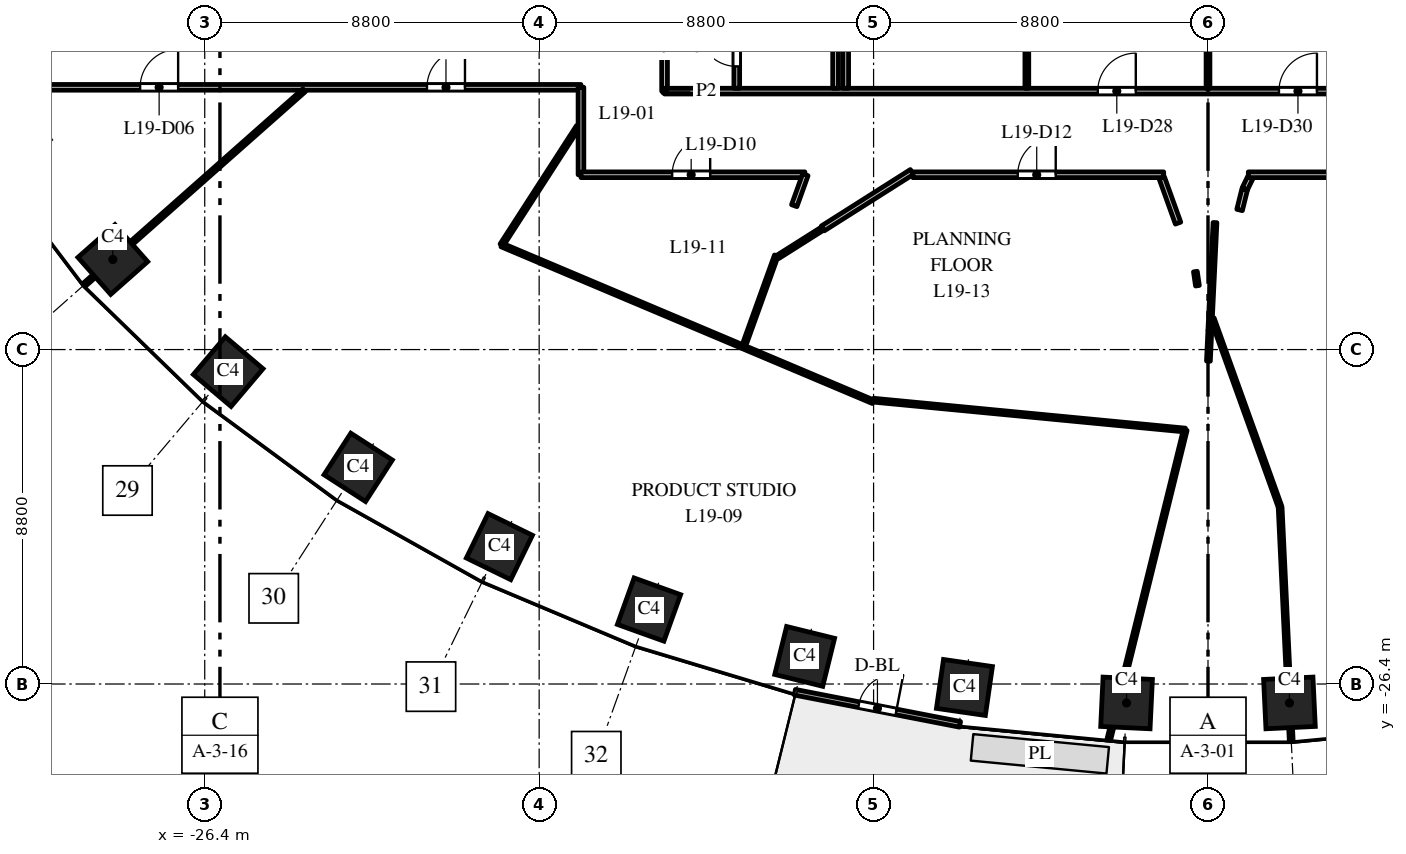
"""IFC4 building model, lengths in metres.
Left out: names, types, materials, properties, quantities, classifications, styles, units other than length and angle.
Written with IfcOpenShell. Run it as: python <this file> out.ifc"""

import sys

from ifc_helpers import new_model, si_unit, direction, frame, frame_2d, origin, origin_2d, place, context, subcontext, project, spatial, rectangle, extrude, element, fill, save


model = new_model("IFC4")
c1 = context("Model", 3, precision=1e-05, world=origin(), true_north=direction((0.0, 1.0)))
c2 = subcontext(c1, "Body", "Model", "MODEL_VIEW")
j1 = project(units=[si_unit("LENGTHUNIT", "METRE"), si_unit("PLANEANGLEUNIT", "RADIAN")], contexts=[c1])
p1 = place(None, origin())
s1 = spatial("IfcSite", under=j1, at=p1, CompositionType="ELEMENT")
p2 = place(p1, origin())
s2 = spatial("IfcBuilding", under=s1, at=p2, CompositionType="ELEMENT")
p3 = place(p2, frame((0.0, 0.0, 88.0)))
s3 = spatial("IfcBuildingStorey", under=s2, at=p3, CompositionType="ELEMENT", Elevation=88.0)
for number, where, z_axis, x_axis in (
    (1, (-28.819, -15.23, 0.0), (0.0, 0.0, 1.0), (0.663, -0.749, 0.0)),
    (2, (-25.783, -18.18, 0.0), (0.0, 0.0, 1.0), (0.763, -0.646, 0.0)),
    (3, (-22.362, -20.7, 0.0), (0.0, 0.0, 1.0), (0.84, -0.542, 0.0)),
    (4, (-18.646, -22.785, 0.0), (0.0, 0.0, 1.0), (0.898, -0.439, 0.0)),
    (5, (-14.709, -24.441, 0.0), (0.0, 0.0, 1.0), (0.941, -0.338, 0.0)),
    (6, (-10.613, -25.674, 0.0), (0.0, 0.0, 1.0), (0.971, -0.24, 0.0)),
    (7, (-6.409, -26.491, 0.0), (0.0, 0.0, 1.0), (0.99, -0.143, 0.0)),
    (8, (-2.143, -26.898, 0.0), (0.0, 0.0, 1.0), (0.999, -0.048, 0.0)),
    (9, (2.143, -26.898, 0.0), (0.0, 0.0, 1.0), (0.999, 0.048, 0.0)),
):
    element("IfcColumn", number, at=place(p3, frame(where, z_axis=z_axis, x_axis=x_axis)), inside=s3, PredefinedType="COLUMN", context=c2, shape_type="SweptSolid", body=[
        extrude(rectangle(XDim=1.3, YDim=1.3, at=origin_2d()), origin(), (0.0, 0.0, 1.0), 4.0),
    ])
p4 = place(p3, frame((-10.871, -26.617, 0.0), z_axis=(0.0, 0.0, 1.0), x_axis=(0.981631174778, -0.190788460615, 0.0)))
e10 = element("IfcWall", 10, at=p4, inside=s3, PredefinedType="STANDARD", context=c2, shape_type="SweptSolid", body=[
    extrude(rectangle(XDim=4.426, YDim=0.15, at=frame_2d((2.213, 0.0))), origin(), (0.0, 0.0, 1.0), 3.7),
])
p5 = place(p4, frame((1.713, 0.0, 0.0)))
e11 = element("IfcOpeningElement", 11, at=p5, cuts=e10, PredefinedType="OPENING", context=c2, shape_type="SweptSolid", body=[
    extrude(rectangle(XDim=1.0, YDim=2.4, at=frame_2d((0.5, 1.2))), frame((0.0, 0.085, 0.0), z_axis=(0.0, -1.0, 0.0), x_axis=(1.0, 0.0, 0.0)), (0.0, 0.0, 1.0), 0.17),
])
p6 = place(p3, frame((-31.5, -10.7, 0.0), z_axis=(0.0, 0.0, 1.0), x_axis=(1.0, 0.0, 0.0)))
e12 = element("IfcWall", 12, at=p6, inside=s3, PredefinedType="PARTITIONING", context=c2, shape_type="SweptSolid", body=[
    extrude(rectangle(XDim=15.0, YDim=0.15, at=frame_2d((7.5, 0.0))), origin(), (0.0, 0.0, 1.0), 3.1),
])
p7 = place(p6, frame((3.4, 0.0, 0.0)))
e13 = element("IfcOpeningElement", 13, at=p7, cuts=e12, PredefinedType="OPENING", context=c2, shape_type="SweptSolid", body=[
    extrude(rectangle(XDim=1.0, YDim=2.1, at=frame_2d((0.5, 1.05))), frame((0.0, 0.085, 0.0), z_axis=(0.0, -1.0, 0.0), x_axis=(1.0, 0.0, 0.0)), (0.0, 0.0, 1.0), 0.17),
])
p8 = place(p6, frame((10.948, 0.0, 0.0)))
e14 = element("IfcOpeningElement", 14, at=p8, cuts=e12, PredefinedType="OPENING", context=c2, shape_type="SweptSolid", body=[
    extrude(rectangle(XDim=1.0, YDim=2.1, at=frame_2d((0.5, 1.05))), frame((0.0, 0.085, 0.0), z_axis=(0.0, -1.0, 0.0), x_axis=(1.0, 0.0, 0.0)), (0.0, 0.0, 1.0), 0.17),
])
p9 = place(p3, frame((-29.569, -15.895, 0.0), z_axis=(0.0, 0.0, 1.0), x_axis=(0.748985701008, 0.662586160198, 0.0)))
e15 = element("IfcWall", 15, at=p9, inside=s3, PredefinedType="PARTITIONING", context=c2, shape_type="SweptSolid", body=[
    extrude(rectangle(XDim=7.723, YDim=0.1, at=frame_2d((3.861, 0.0))), origin(), (0.0, 0.0, 1.0), 2.9),
])
p10 = place(p3, frame((-18.586, -14.849, 0.0), z_axis=(0.0, 0.0, 1.0), x_axis=(0.542227325377, 0.840231829684, 0.0)))
e16 = element("IfcWall", 16, at=p10, inside=s3, PredefinedType="PARTITIONING", context=c2, shape_type="SweptSolid", body=[
    extrude(rectangle(XDim=3.709, YDim=0.1, at=frame_2d((1.854, 0.0))), origin(), (0.0, 0.0, 1.0), 2.75),
])
p11 = place(p3, frame((-18.586, -14.849, 0.0), z_axis=(0.0, 0.0, 1.0), x_axis=(0.921309292198, -0.388830539066, 0.0)))
e17 = element("IfcWall", 17, at=p11, inside=s3, PredefinedType="PARTITIONING", context=c2, shape_type="SweptSolid", body=[
    extrude(rectangle(XDim=10.609, YDim=0.1, at=frame_2d((5.304, 0.0))), origin(), (0.0, 0.0, 1.0), 2.85),
])
p12 = place(p3, frame((-16.5, -13.0, 0.0), z_axis=(0.0, 0.0, 1.0), x_axis=(0.0, 1.0, 0.0)))
e18 = element("IfcWall", 18, at=p12, inside=s3, PredefinedType="PARTITIONING", context=c2, shape_type="SweptSolid", body=[
    extrude(rectangle(XDim=2.3, YDim=0.15, at=frame_2d((1.15, 0.0))), origin(), (0.0, 0.0, 1.0), 2.75),
])
p13 = place(p3, frame((-16.5, -13.0, 0.0), z_axis=(0.0, 0.0, 1.0), x_axis=(1.0, 0.0, 0.0)))
e19 = element("IfcWall", 19, at=p13, inside=s3, PredefinedType="PARTITIONING", context=c2, shape_type="SweptSolid", body=[
    extrude(rectangle(XDim=5.893, YDim=0.15, at=frame_2d((2.947, 0.0))), origin(), (0.0, 0.0, 1.0), 2.85),
])
p14 = place(p13, frame((2.4, 0.0, 0.0)))
e20 = element("IfcOpeningElement", 20, at=p14, cuts=e19, PredefinedType="OPENING", context=c2, shape_type="SweptSolid", body=[
    extrude(rectangle(XDim=1.0, YDim=2.1, at=frame_2d((0.5, 1.05))), frame((0.0, 0.085, 0.0), z_axis=(0.0, -1.0, 0.0), x_axis=(1.0, 0.0, 0.0)), (0.0, 0.0, 1.0), 0.17),
])
p15 = place(p3, frame((-14.3, -10.8, 0.0), z_axis=(0.0, 0.0, 1.0), x_axis=(0.0, 1.0, 0.0)))
e21 = element("IfcWall", 21, at=p15, inside=s3, PredefinedType="PARTITIONING", context=c2, shape_type="SweptSolid", body=[
    extrude(rectangle(XDim=21.6, YDim=0.15, at=frame_2d((10.8, 0.0))), origin(), (0.0, 0.0, 1.0), 2.75),
])
p16 = place(p15, frame((10.4, 0.0, 0.0)))
e22 = element("IfcOpeningElement", 22, at=p16, cuts=e21, PredefinedType="OPENING", context=c2, shape_type="SweptSolid", body=[
    extrude(rectangle(XDim=1.0, YDim=2.1, at=frame_2d((0.5, 1.05))), frame((0.0, 0.085, 0.0), z_axis=(0.0, -1.0, 0.0), x_axis=(1.0, 0.0, 0.0)), (0.0, 0.0, 1.0), 0.17),
])
p17 = place(p3, frame((-14.3, -10.8, 0.0), z_axis=(0.0, 0.0, 1.0), x_axis=(1.0, 0.0, 0.0)))
e23 = element("IfcWall", 23, at=p17, inside=s3, PredefinedType="PARTITIONING", context=c2, shape_type="SweptSolid", body=[
    extrude(rectangle(XDim=28.6, YDim=0.15, at=frame_2d((14.3, 0.0))), origin(), (0.0, 0.0, 1.0), 2.85),
])
p18 = place(p17, frame((11.4, 0.0, 0.0)))
e24 = element("IfcOpeningElement", 24, at=p18, cuts=e23, PredefinedType="OPENING", context=c2, shape_type="SweptSolid", body=[
    extrude(rectangle(XDim=1.0, YDim=2.1, at=frame_2d((0.5, 1.05))), frame((0.0, 0.085, 0.0), z_axis=(0.0, -1.0, 0.0), x_axis=(1.0, 0.0, 0.0)), (0.0, 0.0, 1.0), 0.17),
])
p19 = place(p17, frame((16.167, 0.0, 0.0)))
e25 = element("IfcOpeningElement", 25, at=p19, cuts=e23, PredefinedType="OPENING", context=c2, shape_type="SweptSolid", body=[
    extrude(rectangle(XDim=1.0, YDim=2.1, at=frame_2d((0.5, 1.05))), frame((0.0, 0.085, 0.0), z_axis=(0.0, -1.0, 0.0), x_axis=(1.0, 0.0, 0.0)), (0.0, 0.0, 1.0), 0.17),
])
p20 = place(p3, frame((-12.4, -10.725, 0.0), z_axis=(0.0, 0.0, 1.0), x_axis=(0.0, 1.0, 0.0)))
e26 = element("IfcWall", 26, at=p20, inside=s3, PredefinedType="PARTITIONING", context=c2, shape_type="SweptSolid", body=[
    extrude(rectangle(XDim=7.065, YDim=0.15, at=frame_2d((3.533, 0.0))), origin(), (0.0, 0.0, 1.0), 2.75),
])
p21 = place(p20, frame((0.575, 0.0, 0.0)))
e27 = element("IfcOpeningElement", 27, at=p21, cuts=e26, PredefinedType="OPENING", context=c2, shape_type="SweptSolid", body=[
    extrude(rectangle(XDim=1.0, YDim=2.1, at=frame_2d((0.5, 1.05))), frame((0.0, 0.085, 0.0), z_axis=(0.0, -1.0, 0.0), x_axis=(1.0, 0.0, 0.0)), (0.0, 0.0, 1.0), 0.17),
])
p22 = place(p20, frame((3.095, 0.0, 0.0)))
e28 = element("IfcOpeningElement", 28, at=p22, cuts=e26, PredefinedType="OPENING", context=c2, shape_type="SweptSolid", body=[
    extrude(rectangle(XDim=1.0, YDim=2.1, at=frame_2d((0.5, 1.05))), frame((0.0, 0.085, 0.0), z_axis=(0.0, -1.0, 0.0), x_axis=(1.0, 0.0, 0.0)), (0.0, 0.0, 1.0), 0.17),
])
p23 = place(p20, frame((5.447, 0.0, 0.0)))
e29 = element("IfcOpeningElement", 29, at=p23, cuts=e26, PredefinedType="OPENING", context=c2, shape_type="SweptSolid", body=[
    extrude(rectangle(XDim=1.0, YDim=2.1, at=frame_2d((0.5, 1.05))), frame((0.0, 0.085, 0.0), z_axis=(0.0, -1.0, 0.0), x_axis=(1.0, 0.0, 0.0)), (0.0, 0.0, 1.0), 0.17),
])
p24 = place(p3, frame((-12.209, -17.486, 0.0), z_axis=(0.0, 0.0, 1.0), x_axis=(0.338698771758, 0.940894862357, 0.0)))
e30 = element("IfcWall", 30, at=p24, inside=s3, PredefinedType="PARTITIONING", context=c2, shape_type="SweptSolid", body=[
    extrude(rectangle(XDim=2.506, YDim=0.1, at=frame_2d((1.253, 0.0))), origin(), (0.0, 0.0, 1.0), 3.7),
])
p25 = place(p3, frame((-11.319, -15.161, 0.0), z_axis=(0.0, 0.0, 1.0), x_axis=(0.845102975348, 0.534603555037, 0.0)))
e31 = element("IfcWall", 31, at=p25, inside=s3, PredefinedType="PARTITIONING", context=c2, shape_type="SweptSolid", body=[
    extrude(rectangle(XDim=1.399, YDim=0.1, at=frame_2d((0.699, 0.0))), origin(), (0.0, 0.0, 1.0), 3.7),
])
p26 = place(p3, frame((-10.888, -13.814, 0.0), z_axis=(0.0, 0.0, 1.0), x_axis=(0.338659506624, 0.940908995904, 0.0)))
e32 = element("IfcWall", 32, at=p26, inside=s3, PredefinedType="PARTITIONING", context=c2, shape_type="SweptSolid", body=[
    extrude(rectangle(XDim=0.865, YDim=0.15, at=frame_2d((0.433, 0.0))), origin(), (0.0, 0.0, 1.0), 2.85),
])
p27 = place(p3, frame((-10.137, -14.413, 0.0), z_axis=(0.0, 0.0, 1.0), x_axis=(0.844666662568, 0.535292657475, 0.0)))
e33 = element("IfcWall", 33, at=p27, inside=s3, PredefinedType="PARTITIONING", context=c2, shape_type="SweptSolid", body=[
    extrude(rectangle(XDim=2.776, YDim=0.15, at=frame_2d((1.388, 0.0))), origin(), (0.0, 0.0, 1.0), 3.7),
])
p28 = place(p3, frame((-9.8, -10.725, 0.0), z_axis=(0.0, 0.0, 1.0), x_axis=(0.0, 1.0, 0.0)))
e34 = element("IfcWall", 34, at=p28, inside=s3, PredefinedType="PARTITIONING", context=c2, shape_type="SweptSolid", body=[
    extrude(rectangle(XDim=7.065, YDim=0.15, at=frame_2d((3.533, 0.0))), origin(), (0.0, 0.0, 1.0), 2.75),
])
p29 = place(p3, frame((-9.533, -10.725, 0.0), z_axis=(0.0, 0.0, 1.0), x_axis=(0.0, 1.0, 0.0)))
e35 = element("IfcWall", 35, at=p29, inside=s3, PredefinedType="PARTITIONING", context=c2, shape_type="SweptSolid", body=[
    extrude(rectangle(XDim=21.45, YDim=0.15, at=frame_2d((10.725, 0.0))), origin(), (0.0, 0.0, 1.0), 2.75),
])
p30 = place(p29, frame((15.575, 0.0, 0.0)))
e36 = element("IfcOpeningElement", 36, at=p30, cuts=e35, PredefinedType="OPENING", context=c2, shape_type="SweptSolid", body=[
    extrude(rectangle(XDim=1.0, YDim=2.1, at=frame_2d((0.5, 1.05))), frame((0.0, 0.085, 0.0), z_axis=(0.0, -1.0, 0.0), x_axis=(1.0, 0.0, 0.0)), (0.0, 0.0, 1.0), 0.17),
])
p31 = place(p3, frame((-8.802, -18.932, 0.0), z_axis=(0.0, 0.0, 1.0), x_axis=(0.99543910623, -0.095399086939, 0.0)))
e37 = element("IfcWall", 37, at=p31, inside=s3, PredefinedType="PARTITIONING", context=c2, shape_type="SweptSolid", body=[
    extrude(rectangle(XDim=8.24, YDim=0.1, at=frame_2d((4.12, 0.0))), origin(), (0.0, 0.0, 1.0), 2.85),
])
p32 = place(p3, frame((-7.767, -13.0, 0.0), z_axis=(0.0, 0.0, 1.0), x_axis=(1.0, 0.0, 0.0)))
e38 = element("IfcWall", 38, at=p32, inside=s3, PredefinedType="PARTITIONING", context=c2, shape_type="SweptSolid", body=[
    extrude(rectangle(XDim=6.601, YDim=0.15, at=frame_2d((3.301, 0.0))), origin(), (0.0, 0.0, 1.0), 2.85),
])
p33 = place(p32, frame((2.76, 0.0, 0.0)))
e39 = element("IfcOpeningElement", 39, at=p33, cuts=e38, PredefinedType="OPENING", context=c2, shape_type="SweptSolid", body=[
    extrude(rectangle(XDim=1.0, YDim=2.1, at=frame_2d((0.5, 1.05))), frame((0.0, 0.085, 0.0), z_axis=(0.0, -1.0, 0.0), x_axis=(1.0, 0.0, 0.0)), (0.0, 0.0, 1.0), 0.17),
])
p34 = place(p3, frame((-4.767, -10.725, 0.0), z_axis=(0.0, 0.0, 1.0), x_axis=(0.0, 1.0, 0.0)))
e40 = element("IfcWall", 40, at=p34, inside=s3, PredefinedType="PARTITIONING", context=c2, shape_type="SweptSolid", body=[
    extrude(rectangle(XDim=4.362, YDim=0.1, at=frame_2d((2.181, 0.0))), origin(), (0.0, 0.0, 1.0), 2.9),
])
p35 = place(p3, frame((-2.609, -27.858, 0.0), z_axis=(0.0, 0.0, 1.0), x_axis=(0.239677840558, 0.970852477334, 0.0)))
e41 = element("IfcWall", 41, at=p35, inside=s3, PredefinedType="PARTITIONING", context=c2, shape_type="SweptSolid", body=[
    extrude(rectangle(XDim=8.385, YDim=0.1, at=frame_2d((4.193, 0.0))), origin(), (0.0, 0.0, 1.0), 2.85),
])
p36 = place(p3, frame((-1.217, -13.079, 0.0), z_axis=(0.0, 0.0, 1.0), x_axis=(0.338140136535, -0.941095769868, 0.0)))
e42 = element("IfcWall", 42, at=p36, inside=s3, PredefinedType="PARTITIONING", context=c2, shape_type="SweptSolid", body=[
    extrude(rectangle(XDim=1.269, YDim=0.15, at=frame_2d((0.634, 0.0))), origin(), (0.0, 0.0, 1.0), 2.85),
])
p37 = place(p3, frame((-0.332, -15.548, 0.0), z_axis=(0.0, 0.0, 1.0), x_axis=(0.143604317757, -0.989635185269, 0.0)))
e43 = element("IfcWall", 43, at=p37, inside=s3, PredefinedType="PARTITIONING", context=c2, shape_type="SweptSolid", body=[
    extrude(rectangle(XDim=0.376, YDim=0.1, at=frame_2d((0.188, 0.0))), origin(), (0.0, 0.0, 1.0), 3.7),
])
p38 = place(p3, frame((0.0, -10.725, 0.0), z_axis=(0.0, 0.0, 1.0), x_axis=(0.0, 1.0, 0.0)))
e44 = element("IfcWall", 44, at=p38, inside=s3, PredefinedType="PARTITIONING", context=c2, shape_type="SweptSolid", body=[
    extrude(rectangle(XDim=3.221, YDim=0.1, at=frame_2d((1.611, 0.0))), origin(), (0.0, 0.0, 1.0), 3.7),
])
p39 = place(p3, frame((0.011, -17.904, 0.0), z_axis=(0.0, 0.0, 1.0), x_axis=(0.046221474857, 0.998931216482, 0.0)))
e45 = element("IfcWall", 45, at=p39, inside=s3, PredefinedType="PARTITIONING", context=c2, shape_type="SweptSolid", body=[
    extrude(rectangle(XDim=0.803, YDim=0.1, at=frame_2d((0.401, 0.0))), origin(), (0.0, 0.0, 1.0), 3.7),
])
p40 = place(p3, frame((0.049, -17.087, 0.0), z_axis=(0.0, 0.0, 1.0), x_axis=(0.047688063475, 0.998862277094, 0.0)))
e46 = element("IfcWall", 46, at=p40, inside=s3, PredefinedType="PARTITIONING", context=c2, shape_type="SweptSolid", body=[
    extrude(rectangle(XDim=2.831, YDim=0.1, at=frame_2d((1.416, 0.0))), origin(), (0.0, 0.0, 1.0), 3.7),
])
p41 = place(p3, frame((0.113, -16.782, 0.0), z_axis=(0.0, 0.0, 1.0), x_axis=(0.338468220543, -0.940977823162, 0.0)))
e47 = element("IfcWall", 47, at=p41, inside=s3, PredefinedType="PARTITIONING", context=c2, shape_type="SweptSolid", body=[
    extrude(rectangle(XDim=5.265, YDim=0.1, at=frame_2d((2.632, 0.0))), origin(), (0.0, 0.0, 1.0), 3.7),
])
p42 = place(p3, frame((0.831, -13.927, 0.0), z_axis=(0.0, 0.0, 1.0), x_axis=(0.240473799965, 0.970655629732, 0.0)))
e48 = element("IfcWall", 48, at=p42, inside=s3, PredefinedType="PARTITIONING", context=c2, shape_type="SweptSolid", body=[
    extrude(rectangle(XDim=0.557, YDim=0.15, at=frame_2d((0.279, 0.0))), origin(), (0.0, 0.0, 1.0), 3.7),
])
p43 = place(p3, frame((0.969, -13.369, 0.0), z_axis=(0.0, 0.0, 1.0), x_axis=(0.440240923942, 0.897879685084, 0.0)))
e49 = element("IfcWall", 49, at=p43, inside=s3, PredefinedType="PARTITIONING", context=c2, shape_type="SweptSolid", body=[
    extrude(rectangle(XDim=0.323, YDim=0.15, at=frame_2d((0.161, 0.0))), origin(), (0.0, 0.0, 1.0), 3.7),
])
p44 = place(p3, frame((1.061, -13.0, 0.0), z_axis=(0.0, 0.0, 1.0), x_axis=(1.0, 0.0, 0.0)))
e50 = element("IfcWall", 50, at=p44, inside=s3, PredefinedType="PARTITIONING", context=c2, shape_type="SweptSolid", body=[
    extrude(rectangle(XDim=6.422, YDim=0.15, at=frame_2d((3.211, 0.0))), origin(), (0.0, 0.0, 1.0), 2.85),
])
p45 = place(p44, frame((2.73, 0.0, 0.0)))
e51 = element("IfcOpeningElement", 51, at=p45, cuts=e50, PredefinedType="OPENING", context=c2, shape_type="SweptSolid", body=[
    extrude(rectangle(XDim=1.0, YDim=2.1, at=frame_2d((0.5, 1.05))), frame((0.0, 0.085, 0.0), z_axis=(0.0, -1.0, 0.0), x_axis=(1.0, 0.0, 0.0)), (0.0, 0.0, 1.0), 0.17),
])
p46 = place(p3, frame((1.898, -21.75, 0.0), z_axis=(0.0, 0.0, 1.0), x_axis=(0.047440765919, -0.998874052986, 0.0)))
e52 = element("IfcWall", 52, at=p46, inside=s3, PredefinedType="PARTITIONING", context=c2, shape_type="SweptSolid", body=[
    extrude(rectangle(XDim=6.155, YDim=0.1, at=frame_2d((3.077, 0.0))), origin(), (0.0, 0.0, 1.0), 2.9),
])
p47 = place(p5, origin())
e53 = element("IfcDoor", 53, at=p47, inside=s3, OperationType="SINGLE_SWING_RIGHT", PredefinedType="DOOR", context=c2, shape_type="SweptSolid", body=[
    extrude(rectangle(XDim=1.0, YDim=2.4, at=frame_2d((0.5, 1.2))), frame((0.0, 0.025, 0.0), z_axis=(0.0, -1.0, 0.0), x_axis=(1.0, 0.0, 0.0)), (0.0, 0.0, 1.0), 0.05),
])
fill(e11, e53)
p48 = place(p21, origin())
e54 = element("IfcDoor", 54, at=p48, inside=s3, OperationType="SINGLE_SWING_RIGHT", PredefinedType="DOOR", context=c2, shape_type="SweptSolid", body=[
    extrude(rectangle(XDim=1.0, YDim=2.1, at=frame_2d((0.5, 1.05))), frame((0.0, 0.025, 0.0), z_axis=(0.0, -1.0, 0.0), x_axis=(1.0, 0.0, 0.0)), (0.0, 0.0, 1.0), 0.05),
])
fill(e27, e54)
p49 = place(p7, origin())
e55 = element("IfcDoor", 55, at=p49, inside=s3, OperationType="SINGLE_SWING_RIGHT", PredefinedType="DOOR", context=c2, shape_type="SweptSolid", body=[
    extrude(rectangle(XDim=1.0, YDim=2.1, at=frame_2d((0.5, 1.05))), frame((0.0, 0.025, 0.0), z_axis=(0.0, -1.0, 0.0), x_axis=(1.0, 0.0, 0.0)), (0.0, 0.0, 1.0), 0.05),
])
fill(e13, e55)
p50 = place(p8, origin())
e56 = element("IfcDoor", 56, at=p50, inside=s3, OperationType="SINGLE_SWING_RIGHT", PredefinedType="DOOR", context=c2, shape_type="SweptSolid", body=[
    extrude(rectangle(XDim=1.0, YDim=2.1, at=frame_2d((0.5, 1.05))), frame((0.0, 0.025, 0.0), z_axis=(0.0, -1.0, 0.0), x_axis=(1.0, 0.0, 0.0)), (0.0, 0.0, 1.0), 0.05),
])
fill(e14, e56)
p51 = place(p14, origin())
e57 = element("IfcDoor", 57, at=p51, inside=s3, OperationType="SINGLE_SWING_RIGHT", PredefinedType="DOOR", context=c2, shape_type="SweptSolid", body=[
    extrude(rectangle(XDim=1.0, YDim=2.1, at=frame_2d((0.5, 1.05))), frame((0.0, 0.025, 0.0), z_axis=(0.0, -1.0, 0.0), x_axis=(1.0, 0.0, 0.0)), (0.0, 0.0, 1.0), 0.05),
])
fill(e20, e57)
p52 = place(p33, origin())
e58 = element("IfcDoor", 58, at=p52, inside=s3, OperationType="SINGLE_SWING_RIGHT", PredefinedType="DOOR", context=c2, shape_type="SweptSolid", body=[
    extrude(rectangle(XDim=1.0, YDim=2.1, at=frame_2d((0.5, 1.05))), frame((0.0, 0.025, 0.0), z_axis=(0.0, -1.0, 0.0), x_axis=(1.0, 0.0, 0.0)), (0.0, 0.0, 1.0), 0.05),
])
fill(e39, e58)
p53 = place(p18, origin())
e59 = element("IfcDoor", 59, at=p53, inside=s3, OperationType="SINGLE_SWING_RIGHT", PredefinedType="DOOR", context=c2, shape_type="SweptSolid", body=[
    extrude(rectangle(XDim=1.0, YDim=2.1, at=frame_2d((0.5, 1.05))), frame((0.0, 0.025, 0.0), z_axis=(0.0, -1.0, 0.0), x_axis=(1.0, 0.0, 0.0)), (0.0, 0.0, 1.0), 0.05),
])
fill(e24, e59)
p54 = place(p19, origin())
e60 = element("IfcDoor", 60, at=p54, inside=s3, OperationType="SINGLE_SWING_RIGHT", PredefinedType="DOOR", context=c2, shape_type="SweptSolid", body=[
    extrude(rectangle(XDim=1.0, YDim=2.1, at=frame_2d((0.5, 1.05))), frame((0.0, 0.025, 0.0), z_axis=(0.0, -1.0, 0.0), x_axis=(1.0, 0.0, 0.0)), (0.0, 0.0, 1.0), 0.05),
])
fill(e25, e60)
save(model, sys.argv[1])
